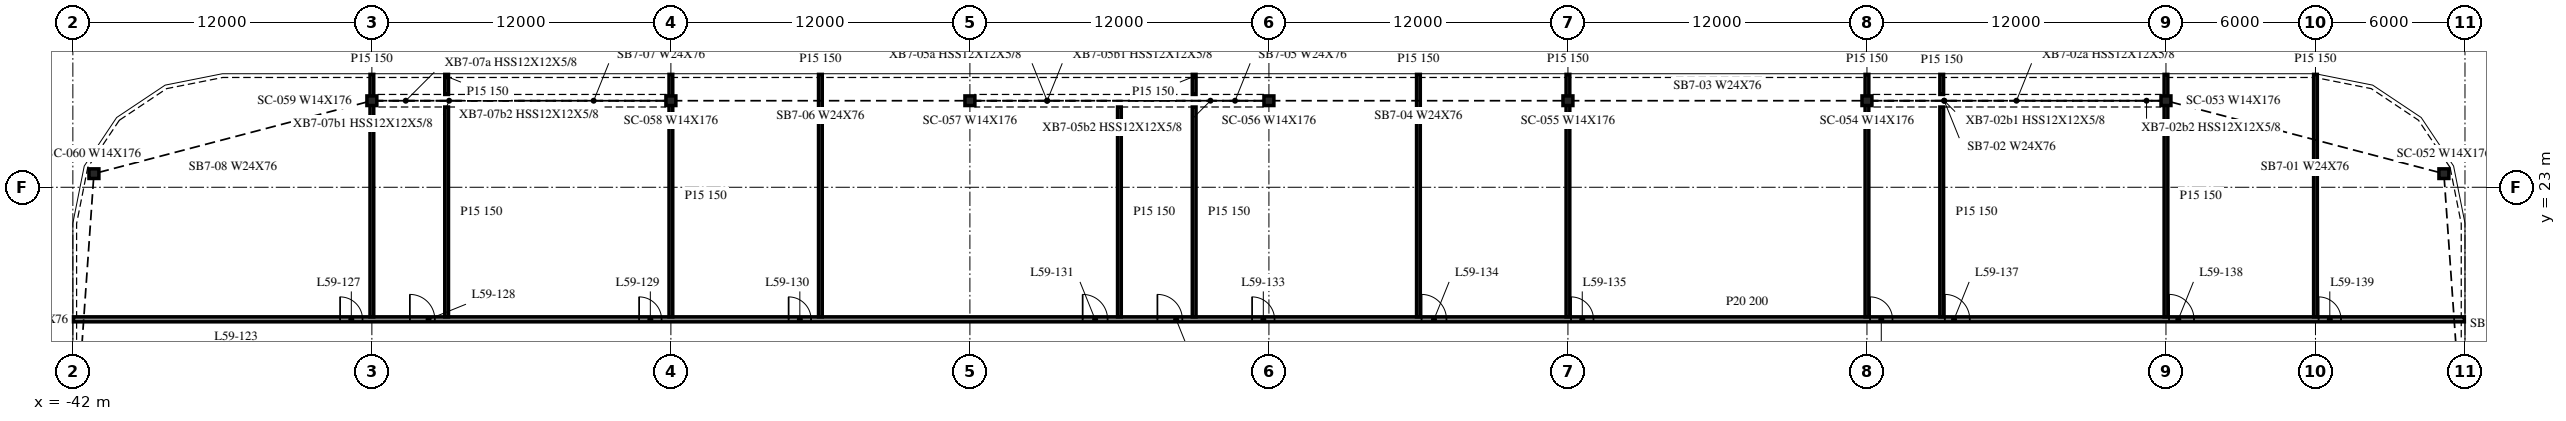
"""IFC4 building model, lengths in metres.
Left out: names, types, materials, properties, quantities, classifications, styles, units other than length and angle.
Written with IfcOpenShell. Run it as: python <this file> out.ifc"""

import sys

from ifc_helpers import new_model, si_unit, direction, frame, frame_2d, origin, origin_2d, place, context, subcontext, project, spatial, rectangle, i_section, extrude, element, fill, save


model = new_model("IFC4")
c1 = context("Model", 3, precision=1e-05, world=origin(), true_north=direction((0.0, 1.0)))
c2 = subcontext(c1, "Body", "Model", "MODEL_VIEW")
j1 = project(units=[si_unit("LENGTHUNIT", "METRE"), si_unit("PLANEANGLEUNIT", "RADIAN")], contexts=[c1])
p1 = place(None, origin())
s1 = spatial("IfcSite", under=j1, at=p1, CompositionType="ELEMENT")
p2 = place(p1, origin())
s2 = spatial("IfcBuilding", under=s1, at=p2, CompositionType="ELEMENT")
p3 = place(p2, frame((0.0, 0.0, 243.8)))
s3 = spatial("IfcBuildingStorey", under=s2, at=p3, CompositionType="ELEMENT", Elevation=243.8)
for number, where, z_axis, x_axis in (
    (1, (53.154, 23.546, -0.34), (0.0, 0.0, 1.0), (1.0, 0.0, 0.0)),
    (2, (42.0, 26.473, -0.34), (0.0, 0.0, 1.0), (1.0, 0.0, 0.0)),
    (3, (30.0, 26.473, -0.34), (0.0, 0.0, 1.0), (1.0, 0.0, 0.0)),
    (4, (18.0, 26.473, -0.34), (0.0, 0.0, 1.0), (1.0, 0.0, 0.0)),
    (5, (6.0, 26.473, -0.34), (0.0, 0.0, 1.0), (1.0, 0.0, 0.0)),
    (6, (-6.0, 26.473, -0.34), (0.0, 0.0, 1.0), (1.0, 0.0, 0.0)),
    (7, (-18.0, 26.473, -0.34), (0.0, 0.0, 1.0), (1.0, 0.0, 0.0)),
    (8, (-30.0, 26.473, -0.34), (0.0, 0.0, 1.0), (1.0, 0.0, 0.0)),
    (9, (-41.154, 23.546, -0.34), (0.0, 0.0, 1.0), (1.0, 0.0, 0.0)),
):
    element("IfcColumn", number, at=place(p3, frame(where, z_axis=z_axis, x_axis=x_axis)), inside=s3, PredefinedType="COLUMN", context=c2, shape_type="SweptSolid", body=[
        extrude(i_section(OverallWidth=0.399, OverallDepth=0.386, WebThickness=0.021, FlangeThickness=0.033, at=origin_2d()), origin(), (0.0, 0.0, 1.0), 3.8),
    ])
p4 = place(p3, frame((-41.975, 17.7, 0.0), z_axis=(0.0, 0.0, 1.0), x_axis=(1.0, 0.0, 0.0)))
e10 = element("IfcWall", 10, at=p4, inside=s3, PredefinedType="PARTITIONING", context=c2, shape_type="SweptSolid", body=[
    extrude(rectangle(XDim=95.95, YDim=0.2, at=frame_2d((47.975, 0.0))), origin(), (0.0, 0.0, 1.0), 3.46),
])
p5 = place(p4, frame((10.7, 0.0, 0.0)))
e11 = element("IfcOpeningElement", 11, at=p5, cuts=e10, PredefinedType="OPENING", context=c2, shape_type="SweptSolid", body=[
    extrude(rectangle(XDim=0.9, YDim=2.1, at=frame_2d((0.45, 1.05))), frame((0.0, 0.11, 0.0), z_axis=(0.0, -1.0, 0.0), x_axis=(1.0, 0.0, 0.0)), (0.0, 0.0, 1.0), 0.22),
])
p6 = place(p4, frame((13.5, 0.0, 0.0)))
e12 = element("IfcOpeningElement", 12, at=p6, cuts=e10, PredefinedType="OPENING", context=c2, shape_type="SweptSolid", body=[
    extrude(rectangle(XDim=1.0, YDim=2.1, at=frame_2d((0.5, 1.05))), frame((0.0, 0.11, 0.0), z_axis=(0.0, -1.0, 0.0), x_axis=(1.0, 0.0, 0.0)), (0.0, 0.0, 1.0), 0.22),
])
p7 = place(p4, frame((22.7, 0.0, 0.0)))
e13 = element("IfcOpeningElement", 13, at=p7, cuts=e10, PredefinedType="OPENING", context=c2, shape_type="SweptSolid", body=[
    extrude(rectangle(XDim=0.9, YDim=2.1, at=frame_2d((0.45, 1.05))), frame((0.0, 0.11, 0.0), z_axis=(0.0, -1.0, 0.0), x_axis=(1.0, 0.0, 0.0)), (0.0, 0.0, 1.0), 0.22),
])
p8 = place(p4, frame((28.7, 0.0, 0.0)))
e14 = element("IfcOpeningElement", 14, at=p8, cuts=e10, PredefinedType="OPENING", context=c2, shape_type="SweptSolid", body=[
    extrude(rectangle(XDim=0.9, YDim=2.1, at=frame_2d((0.45, 1.05))), frame((0.0, 0.11, 0.0), z_axis=(0.0, -1.0, 0.0), x_axis=(1.0, 0.0, 0.0)), (0.0, 0.0, 1.0), 0.22),
])
p9 = place(p4, frame((40.5, 0.0, 0.0)))
e15 = element("IfcOpeningElement", 15, at=p9, cuts=e10, PredefinedType="OPENING", context=c2, shape_type="SweptSolid", body=[
    extrude(rectangle(XDim=1.0, YDim=2.1, at=frame_2d((0.5, 1.05))), frame((0.0, 0.11, 0.0), z_axis=(0.0, -1.0, 0.0), x_axis=(1.0, 0.0, 0.0)), (0.0, 0.0, 1.0), 0.22),
])
p10 = place(p4, frame((43.5, 0.0, 0.0)))
e16 = element("IfcOpeningElement", 16, at=p10, cuts=e10, PredefinedType="OPENING", context=c2, shape_type="SweptSolid", body=[
    extrude(rectangle(XDim=1.0, YDim=2.1, at=frame_2d((0.5, 1.05))), frame((0.0, 0.11, 0.0), z_axis=(0.0, -1.0, 0.0), x_axis=(1.0, 0.0, 0.0)), (0.0, 0.0, 1.0), 0.22),
])
p11 = place(p4, frame((47.3, 0.0, 0.0)))
e17 = element("IfcOpeningElement", 17, at=p11, cuts=e10, PredefinedType="OPENING", context=c2, shape_type="SweptSolid", body=[
    extrude(rectangle(XDim=0.9, YDim=2.1, at=frame_2d((0.45, 1.05))), frame((0.0, 0.11, 0.0), z_axis=(0.0, -1.0, 0.0), x_axis=(1.0, 0.0, 0.0)), (0.0, 0.0, 1.0), 0.22),
])
p12 = place(p4, frame((54.1, 0.0, 0.0)))
e18 = element("IfcOpeningElement", 18, at=p12, cuts=e10, PredefinedType="OPENING", context=c2, shape_type="SweptSolid", body=[
    extrude(rectangle(XDim=1.0, YDim=2.1, at=frame_2d((0.5, 1.05))), frame((0.0, 0.11, 0.0), z_axis=(0.0, -1.0, 0.0), x_axis=(1.0, 0.0, 0.0)), (0.0, 0.0, 1.0), 0.22),
])
p13 = place(p4, frame((60.1, 0.0, 0.0)))
e19 = element("IfcOpeningElement", 19, at=p13, cuts=e10, PredefinedType="OPENING", context=c2, shape_type="SweptSolid", body=[
    extrude(rectangle(XDim=0.9, YDim=2.1, at=frame_2d((0.45, 1.05))), frame((0.0, 0.11, 0.0), z_axis=(0.0, -1.0, 0.0), x_axis=(1.0, 0.0, 0.0)), (0.0, 0.0, 1.0), 0.22),
])
p14 = place(p4, frame((72.1, 0.0, 0.0)))
e20 = element("IfcOpeningElement", 20, at=p14, cuts=e10, PredefinedType="OPENING", context=c2, shape_type="SweptSolid", body=[
    extrude(rectangle(XDim=0.9, YDim=2.1, at=frame_2d((0.45, 1.05))), frame((0.0, 0.11, 0.0), z_axis=(0.0, -1.0, 0.0), x_axis=(1.0, 0.0, 0.0)), (0.0, 0.0, 1.0), 0.22),
])
p15 = place(p4, frame((75.1, 0.0, 0.0)))
e21 = element("IfcOpeningElement", 21, at=p15, cuts=e10, PredefinedType="OPENING", context=c2, shape_type="SweptSolid", body=[
    extrude(rectangle(XDim=1.0, YDim=2.1, at=frame_2d((0.5, 1.05))), frame((0.0, 0.11, 0.0), z_axis=(0.0, -1.0, 0.0), x_axis=(1.0, 0.0, 0.0)), (0.0, 0.0, 1.0), 0.22),
])
p16 = place(p4, frame((84.1, 0.0, 0.0)))
e22 = element("IfcOpeningElement", 22, at=p16, cuts=e10, PredefinedType="OPENING", context=c2, shape_type="SweptSolid", body=[
    extrude(rectangle(XDim=1.0, YDim=2.1, at=frame_2d((0.5, 1.05))), frame((0.0, 0.11, 0.0), z_axis=(0.0, -1.0, 0.0), x_axis=(1.0, 0.0, 0.0)), (0.0, 0.0, 1.0), 0.22),
])
p17 = place(p4, frame((90.1, 0.0, 0.0)))
e23 = element("IfcOpeningElement", 23, at=p17, cuts=e10, PredefinedType="OPENING", context=c2, shape_type="SweptSolid", body=[
    extrude(rectangle(XDim=0.9, YDim=2.1, at=frame_2d((0.45, 1.05))), frame((0.0, 0.11, 0.0), z_axis=(0.0, -1.0, 0.0), x_axis=(1.0, 0.0, 0.0)), (0.0, 0.0, 1.0), 0.22),
])
p18 = place(p3, frame((-30.0, 17.8, 0.0), z_axis=(0.0, 0.0, 1.0), x_axis=(0.0, 1.0, 0.0)))
e24 = element("IfcWall", 24, at=p18, inside=s3, PredefinedType="PARTITIONING", context=c2, shape_type="SweptSolid", body=[
    extrude(rectangle(XDim=9.731, YDim=0.15, at=frame_2d((4.865, 0.0))), origin(), (0.0, 0.0, 1.0), 3.46),
])
p19 = place(p3, frame((-27.0, 17.8, 0.0), z_axis=(0.0, 0.0, 1.0), x_axis=(0.0, 1.0, 0.0)))
e25 = element("IfcWall", 25, at=p19, inside=s3, PredefinedType="PARTITIONING", context=c2, shape_type="SweptSolid", body=[
    extrude(rectangle(XDim=8.421, YDim=0.15, at=frame_2d((4.21, 0.0))), origin(), (0.0, 0.0, 1.0), 3.46),
])
p20 = place(p3, frame((-27.0, 26.725, 0.0), z_axis=(0.0, 0.0, 1.0), x_axis=(0.0, 1.0, 0.0)))
e26 = element("IfcWall", 26, at=p20, inside=s3, PredefinedType="PARTITIONING", context=c2, shape_type="SweptSolid", body=[
    extrude(rectangle(XDim=0.806, YDim=0.15, at=frame_2d((0.403, 0.0))), origin(), (0.0, 0.0, 1.0), 3.46),
])
for number, where, z_axis, x_axis in (
    (27, (-18.0, 17.8, 0.0), (0.0, 0.0, 1.0), (0.0, 1.0, 0.0)),
    (28, (-12.0, 17.8, 0.0), (0.0, 0.0, 1.0), (0.0, 1.0, 0.0)),
):
    element("IfcWall", number, at=place(p3, frame(where, z_axis=z_axis, x_axis=x_axis)), inside=s3, PredefinedType="PARTITIONING", context=c2, shape_type="SweptSolid", body=[
        extrude(rectangle(XDim=9.731, YDim=0.15, at=frame_2d((4.865, 0.0))), origin(), (0.0, 0.0, 1.0), 3.46),
    ])
for number, where, z_axis, x_axis in (
    (29, (0.0, 17.8, 0.0), (0.0, 0.0, 1.0), (0.0, 1.0, 0.0)),
    (30, (3.0, 17.8, 0.0), (0.0, 0.0, 1.0), (0.0, 1.0, 0.0)),
):
    element("IfcWall", number, at=place(p3, frame(where, z_axis=z_axis, x_axis=x_axis)), inside=s3, PredefinedType="PARTITIONING", context=c2, shape_type="SweptSolid", body=[
        extrude(rectangle(XDim=8.421, YDim=0.15, at=frame_2d((4.21, 0.0))), origin(), (0.0, 0.0, 1.0), 3.46),
    ])
p21 = place(p3, frame((3.0, 26.725, 0.0), z_axis=(0.0, 0.0, 1.0), x_axis=(0.0, 1.0, 0.0)))
e31 = element("IfcWall", 31, at=p21, inside=s3, PredefinedType="PARTITIONING", context=c2, shape_type="SweptSolid", body=[
    extrude(rectangle(XDim=0.806, YDim=0.15, at=frame_2d((0.403, 0.0))), origin(), (0.0, 0.0, 1.0), 3.46),
])
for number, where, z_axis, x_axis in (
    (32, (12.0, 17.8, 0.0), (0.0, 0.0, 1.0), (0.0, 1.0, 0.0)),
    (33, (18.0, 17.8, 0.0), (0.0, 0.0, 1.0), (0.0, 1.0, 0.0)),
    (34, (30.0, 17.8, 0.0), (0.0, 0.0, 1.0), (0.0, 1.0, 0.0)),
):
    element("IfcWall", number, at=place(p3, frame(where, z_axis=z_axis, x_axis=x_axis)), inside=s3, PredefinedType="PARTITIONING", context=c2, shape_type="SweptSolid", body=[
        extrude(rectangle(XDim=9.731, YDim=0.15, at=frame_2d((4.865, 0.0))), origin(), (0.0, 0.0, 1.0), 3.46),
    ])
p22 = place(p3, frame((33.0, 17.8, 0.0), z_axis=(0.0, 0.0, 1.0), x_axis=(0.0, 1.0, 0.0)))
e35 = element("IfcWall", 35, at=p22, inside=s3, PredefinedType="PARTITIONING", context=c2, shape_type="SweptSolid", body=[
    extrude(rectangle(XDim=8.421, YDim=0.15, at=frame_2d((4.21, 0.0))), origin(), (0.0, 0.0, 1.0), 3.46),
])
p23 = place(p3, frame((33.0, 26.725, 0.0), z_axis=(0.0, 0.0, 1.0), x_axis=(0.0, 1.0, 0.0)))
e36 = element("IfcWall", 36, at=p23, inside=s3, PredefinedType="PARTITIONING", context=c2, shape_type="SweptSolid", body=[
    extrude(rectangle(XDim=0.806, YDim=0.15, at=frame_2d((0.403, 0.0))), origin(), (0.0, 0.0, 1.0), 3.46),
])
for number, where, z_axis, x_axis in (
    (37, (42.0, 17.8, 0.0), (0.0, 0.0, 1.0), (0.0, 1.0, 0.0)),
    (38, (48.0, 17.8, 0.0), (0.0, 0.0, 1.0), (0.0, 1.0, 0.0)),
):
    element("IfcWall", number, at=place(p3, frame(where, z_axis=z_axis, x_axis=x_axis)), inside=s3, PredefinedType="PARTITIONING", context=c2, shape_type="SweptSolid", body=[
        extrude(rectangle(XDim=9.731, YDim=0.15, at=frame_2d((4.865, 0.0))), origin(), (0.0, 0.0, 1.0), 3.46),
    ])
p24 = place(p5, origin())
e39 = element("IfcDoor", 39, at=p24, inside=s3, OperationType="SINGLE_SWING_LEFT", PredefinedType="DOOR", context=c2, shape_type="SweptSolid", body=[
    extrude(rectangle(XDim=0.9, YDim=2.1, at=frame_2d((0.45, 1.05))), frame((0.0, 0.025, 0.0), z_axis=(0.0, -1.0, 0.0), x_axis=(1.0, 0.0, 0.0)), (0.0, 0.0, 1.0), 0.05),
])
fill(e11, e39)
p25 = place(p6, origin())
e40 = element("IfcDoor", 40, at=p25, inside=s3, OperationType="SINGLE_SWING_LEFT", PredefinedType="DOOR", context=c2, shape_type="SweptSolid", body=[
    extrude(rectangle(XDim=1.0, YDim=2.1, at=frame_2d((0.5, 1.05))), frame((0.0, 0.025, 0.0), z_axis=(0.0, -1.0, 0.0), x_axis=(1.0, 0.0, 0.0)), (0.0, 0.0, 1.0), 0.05),
])
fill(e12, e40)
p26 = place(p7, origin())
e41 = element("IfcDoor", 41, at=p26, inside=s3, OperationType="SINGLE_SWING_LEFT", PredefinedType="DOOR", context=c2, shape_type="SweptSolid", body=[
    extrude(rectangle(XDim=0.9, YDim=2.1, at=frame_2d((0.45, 1.05))), frame((0.0, 0.025, 0.0), z_axis=(0.0, -1.0, 0.0), x_axis=(1.0, 0.0, 0.0)), (0.0, 0.0, 1.0), 0.05),
])
fill(e13, e41)
p27 = place(p8, origin())
e42 = element("IfcDoor", 42, at=p27, inside=s3, OperationType="SINGLE_SWING_LEFT", PredefinedType="DOOR", context=c2, shape_type="SweptSolid", body=[
    extrude(rectangle(XDim=0.9, YDim=2.1, at=frame_2d((0.45, 1.05))), frame((0.0, 0.025, 0.0), z_axis=(0.0, -1.0, 0.0), x_axis=(1.0, 0.0, 0.0)), (0.0, 0.0, 1.0), 0.05),
])
fill(e14, e42)
p28 = place(p9, origin())
e43 = element("IfcDoor", 43, at=p28, inside=s3, OperationType="SINGLE_SWING_LEFT", PredefinedType="DOOR", context=c2, shape_type="SweptSolid", body=[
    extrude(rectangle(XDim=1.0, YDim=2.1, at=frame_2d((0.5, 1.05))), frame((0.0, 0.025, 0.0), z_axis=(0.0, -1.0, 0.0), x_axis=(1.0, 0.0, 0.0)), (0.0, 0.0, 1.0), 0.05),
])
fill(e15, e43)
p29 = place(p10, origin())
e44 = element("IfcDoor", 44, at=p29, inside=s3, OperationType="SINGLE_SWING_LEFT", PredefinedType="DOOR", context=c2, shape_type="SweptSolid", body=[
    extrude(rectangle(XDim=1.0, YDim=2.1, at=frame_2d((0.5, 1.05))), frame((0.0, 0.025, 0.0), z_axis=(0.0, -1.0, 0.0), x_axis=(1.0, 0.0, 0.0)), (0.0, 0.0, 1.0), 0.05),
])
fill(e16, e44)
p30 = place(p11, origin())
e45 = element("IfcDoor", 45, at=p30, inside=s3, OperationType="SINGLE_SWING_LEFT", PredefinedType="DOOR", context=c2, shape_type="SweptSolid", body=[
    extrude(rectangle(XDim=0.9, YDim=2.1, at=frame_2d((0.45, 1.05))), frame((0.0, 0.025, 0.0), z_axis=(0.0, -1.0, 0.0), x_axis=(1.0, 0.0, 0.0)), (0.0, 0.0, 1.0), 0.05),
])
fill(e17, e45)
p31 = place(p12, origin())
e46 = element("IfcDoor", 46, at=p31, inside=s3, OperationType="SINGLE_SWING_RIGHT", PredefinedType="DOOR", context=c2, shape_type="SweptSolid", body=[
    extrude(rectangle(XDim=1.0, YDim=2.1, at=frame_2d((0.5, 1.05))), frame((0.0, 0.025, 0.0), z_axis=(0.0, -1.0, 0.0), x_axis=(1.0, 0.0, 0.0)), (0.0, 0.0, 1.0), 0.05),
])
fill(e18, e46)
p32 = place(p13, origin())
e47 = element("IfcDoor", 47, at=p32, inside=s3, OperationType="SINGLE_SWING_RIGHT", PredefinedType="DOOR", context=c2, shape_type="SweptSolid", body=[
    extrude(rectangle(XDim=0.9, YDim=2.1, at=frame_2d((0.45, 1.05))), frame((0.0, 0.025, 0.0), z_axis=(0.0, -1.0, 0.0), x_axis=(1.0, 0.0, 0.0)), (0.0, 0.0, 1.0), 0.05),
])
fill(e19, e47)
p33 = place(p14, origin())
e48 = element("IfcDoor", 48, at=p33, inside=s3, OperationType="SINGLE_SWING_RIGHT", PredefinedType="DOOR", context=c2, shape_type="SweptSolid", body=[
    extrude(rectangle(XDim=0.9, YDim=2.1, at=frame_2d((0.45, 1.05))), frame((0.0, 0.025, 0.0), z_axis=(0.0, -1.0, 0.0), x_axis=(1.0, 0.0, 0.0)), (0.0, 0.0, 1.0), 0.05),
])
fill(e20, e48)
p34 = place(p15, origin())
e49 = element("IfcDoor", 49, at=p34, inside=s3, OperationType="SINGLE_SWING_RIGHT", PredefinedType="DOOR", context=c2, shape_type="SweptSolid", body=[
    extrude(rectangle(XDim=1.0, YDim=2.1, at=frame_2d((0.5, 1.05))), frame((0.0, 0.025, 0.0), z_axis=(0.0, -1.0, 0.0), x_axis=(1.0, 0.0, 0.0)), (0.0, 0.0, 1.0), 0.05),
])
fill(e21, e49)
p35 = place(p16, origin())
e50 = element("IfcDoor", 50, at=p35, inside=s3, OperationType="SINGLE_SWING_RIGHT", PredefinedType="DOOR", context=c2, shape_type="SweptSolid", body=[
    extrude(rectangle(XDim=1.0, YDim=2.1, at=frame_2d((0.5, 1.05))), frame((0.0, 0.025, 0.0), z_axis=(0.0, -1.0, 0.0), x_axis=(1.0, 0.0, 0.0)), (0.0, 0.0, 1.0), 0.05),
])
fill(e22, e50)
p36 = place(p17, origin())
e51 = element("IfcDoor", 51, at=p36, inside=s3, OperationType="SINGLE_SWING_RIGHT", PredefinedType="DOOR", context=c2, shape_type="SweptSolid", body=[
    extrude(rectangle(XDim=0.9, YDim=2.1, at=frame_2d((0.45, 1.05))), frame((0.0, 0.025, 0.0), z_axis=(0.0, -1.0, 0.0), x_axis=(1.0, 0.0, 0.0)), (0.0, 0.0, 1.0), 0.05),
])
fill(e23, e51)
save(model, sys.argv[1])
